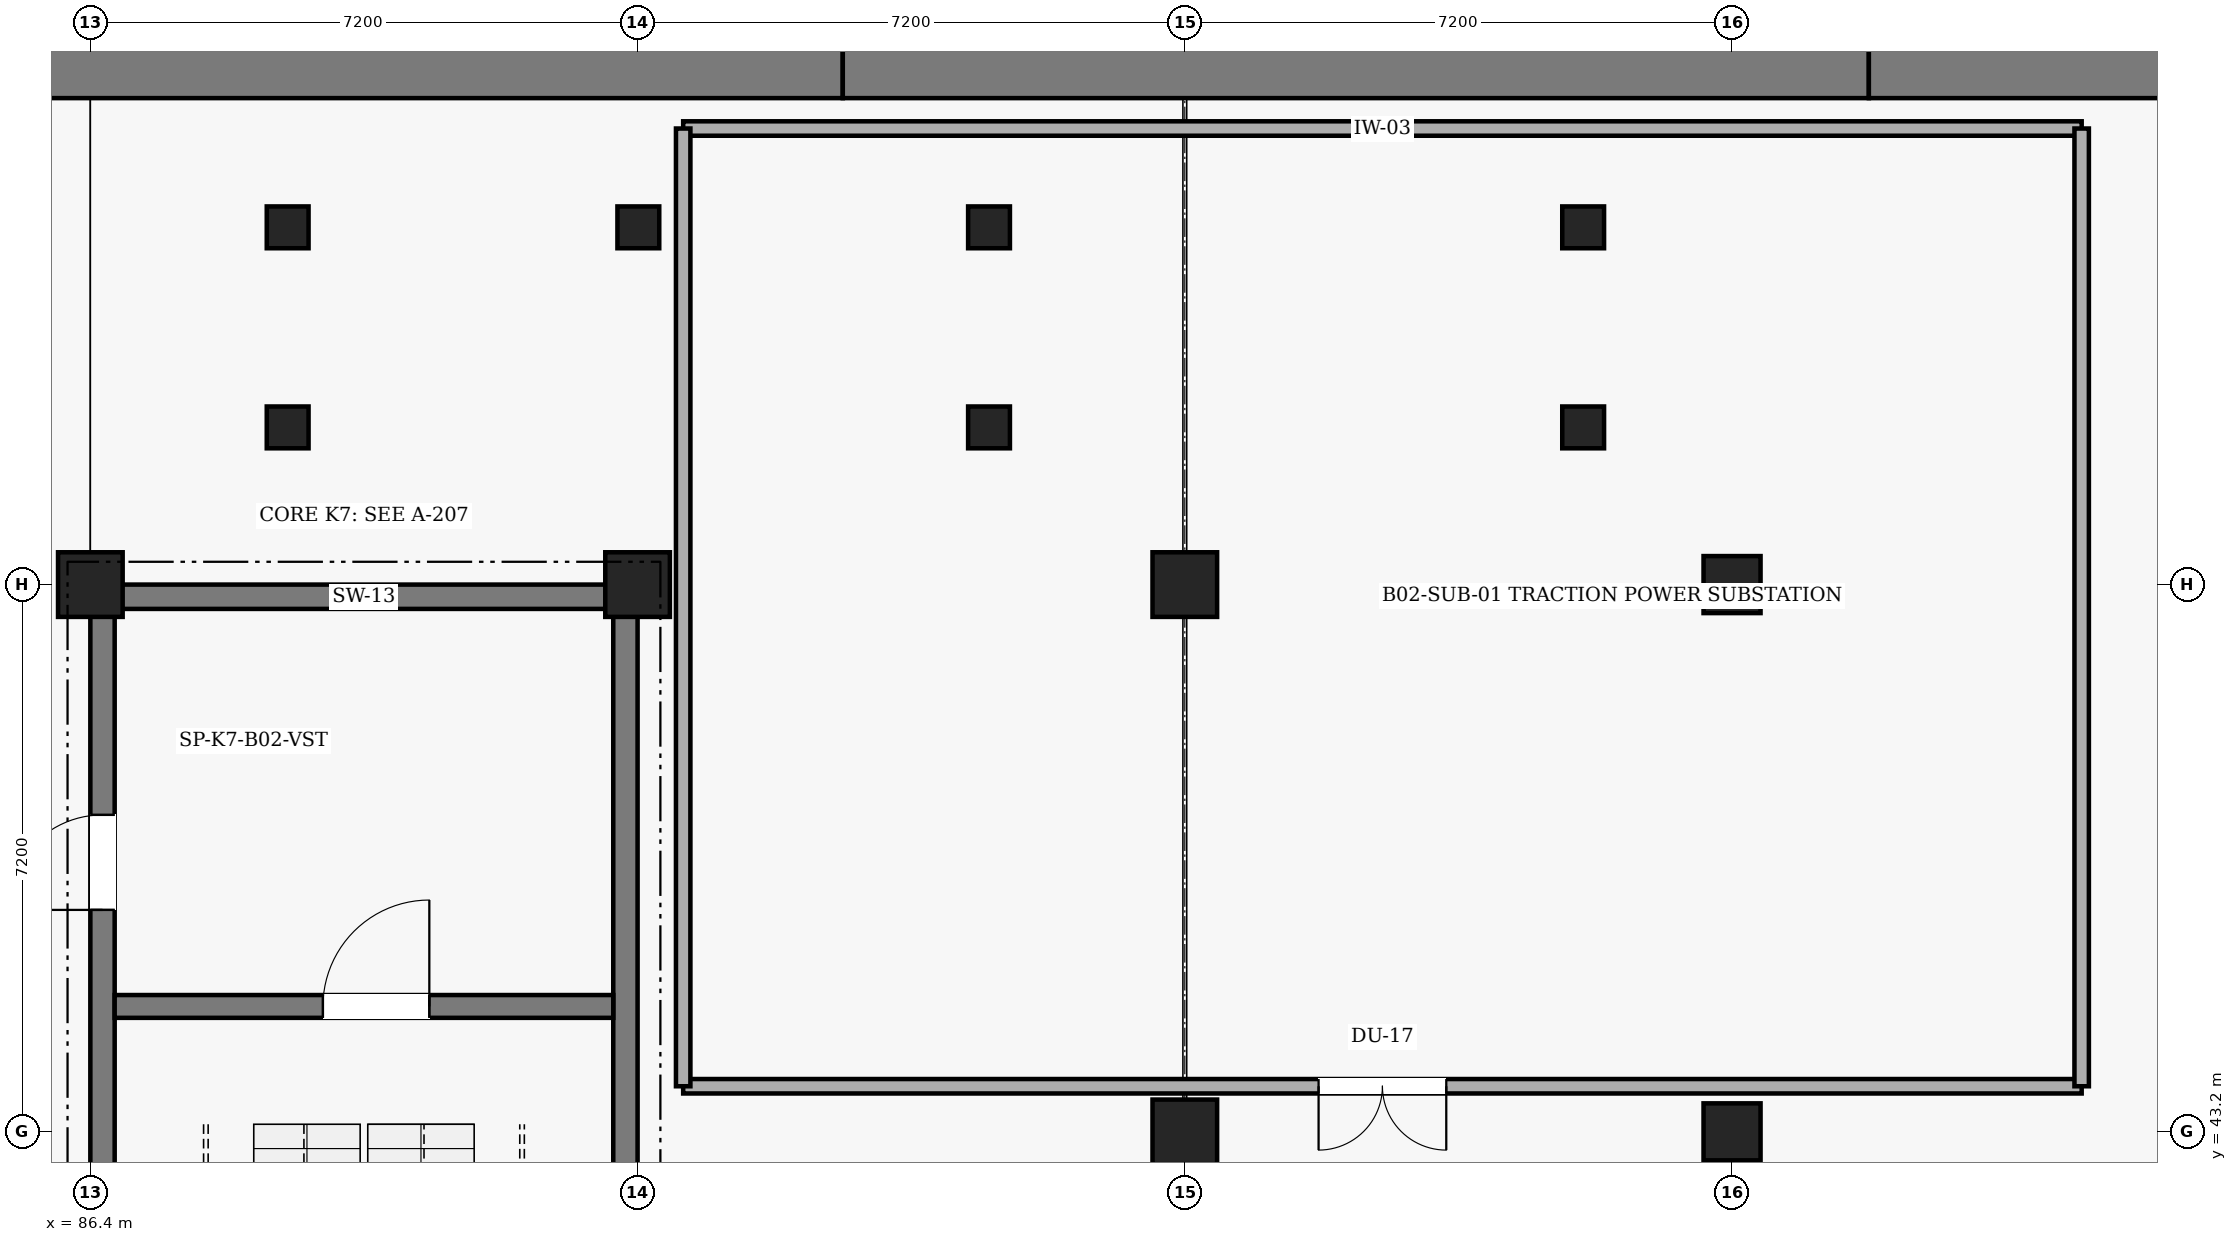
"""IFC4 building model, lengths in metres.
Left out: names, types, materials, properties, quantities, classifications, styles, units other than length and angle.
Written with IfcOpenShell. Run it as: python <this file> out.ifc"""

import sys

from ifc_helpers import new_model, si_unit, direction, frame, frame_2d, origin, origin_2d, place, context, subcontext, project, spatial, rectangle, extrude, element, fill, save


model = new_model("IFC4")
c1 = context("Model", 3, precision=1e-05, world=origin(), true_north=direction((0.0, 1.0)))
c2 = subcontext(c1, "Body", "Model", "MODEL_VIEW")
j1 = project(units=[si_unit("LENGTHUNIT", "METRE"), si_unit("PLANEANGLEUNIT", "RADIAN")], contexts=[c1])
p1 = place(None, origin())
s1 = spatial("IfcSite", under=j1, at=p1, CompositionType="ELEMENT")
p2 = place(p1, origin())
s2 = spatial("IfcBuilding", under=s1, at=p2, CompositionType="ELEMENT")
p3 = place(p2, frame((0.0, 0.0, -10.8)))
s3 = spatial("IfcBuildingStorey", under=s2, at=p3, CompositionType="ELEMENT", Elevation=-10.8)
for number, where, z_axis, x_axis in (
    (1, (82.8, 57.2, 0.0), (0.0, 0.0, 1.0), (1.0, 0.0, 0.0)),
    (2, (96.3, 57.2, 0.0), (0.0, 0.0, 1.0), (1.0, 0.0, 0.0)),
):
    element("IfcWall", number, at=place(p3, frame(where, z_axis=z_axis, x_axis=x_axis)), inside=s3, PredefinedType="USERDEFINED", context=c2, shape_type="SweptSolid", body=[
        extrude(rectangle(XDim=13.5, YDim=0.8, at=frame_2d((6.75, 0.0))), origin(), (0.0, 0.0, 1.0), 5.0),
    ])
p4 = place(p3, frame((109.8, 57.2, 0.0), z_axis=(0.0, 0.0, 1.0), x_axis=(1.0, 0.0, 0.0)))
e3 = element("IfcWall", 3, at=p4, inside=s3, PredefinedType="USERDEFINED", context=c2, shape_type="SweptSolid", body=[
    extrude(rectangle(XDim=5.35, YDim=0.8, at=frame_2d((2.675, 0.0))), origin(), (0.0, 0.0, 1.0), 5.0),
])
p5 = place(p3, frame((86.4, 50.24, 0.0), z_axis=(0.0, 0.0, 1.0), x_axis=(1.0, 0.0, 0.0)))
e4 = element("IfcWall", 4, at=p5, inside=s3, PredefinedType="SHEAR", context=c2, shape_type="SweptSolid", body=[
    extrude(rectangle(XDim=7.2, YDim=0.32, at=frame_2d((3.6, 0.0))), origin(), (0.0, 0.0, 1.0), 5.4),
])
p6 = place(p3, frame((93.44, 50.08, 0.0), z_axis=(0.0, 0.0, 1.0), x_axis=(0.0, -1.0, 0.0)))
e5 = element("IfcWall", 5, at=p6, inside=s3, PredefinedType="SHEAR", context=c2, shape_type="SweptSolid", body=[
    extrude(rectangle(XDim=13.76, YDim=0.32, at=frame_2d((6.88, 0.0))), origin(), (0.0, 0.0, 1.0), 5.4),
])
p7 = place(p3, frame((86.56, 36.32, 0.0), z_axis=(0.0, 0.0, 1.0), x_axis=(0.0, 1.0, 0.0)))
e6 = element("IfcWall", 6, at=p7, inside=s3, PredefinedType="SHEAR", context=c2, shape_type="SweptSolid", body=[
    extrude(rectangle(XDim=13.76, YDim=0.32, at=frame_2d((6.88, 0.0))), origin(), (0.0, 0.0, 1.0), 5.4),
])
p8 = place(p7, frame((9.8, 0.0, 0.0)))
e7 = element("IfcOpeningElement", 7, at=p8, cuts=e6, PredefinedType="OPENING", context=c2, shape_type="SweptSolid", body=[
    extrude(rectangle(XDim=1.25, YDim=2.2, at=frame_2d((0.625, 1.1))), frame((0.0, 0.17, 0.0), z_axis=(0.0, -1.0, 0.0), x_axis=(1.0, 0.0, 0.0)), (0.0, 0.0, 1.0), 0.34),
])
p9 = place(p3, frame((86.72, 44.85, 0.0), z_axis=(0.0, 0.0, 1.0), x_axis=(1.0, 0.0, 0.0)))
e8 = element("IfcWall", 8, at=p9, inside=s3, PredefinedType="SHEAR", context=c2, shape_type="SweptSolid", body=[
    extrude(rectangle(XDim=6.56, YDim=0.3, at=frame_2d((3.28, 0.0))), origin(), (0.0, 0.0, 1.0), 5.4),
])
p10 = place(p9, frame((2.74, 0.0, 0.0)))
e9 = element("IfcOpeningElement", 9, at=p10, cuts=e8, PredefinedType="OPENING", context=c2, shape_type="SweptSolid", body=[
    extrude(rectangle(XDim=1.4, YDim=2.2, at=frame_2d((0.7, 1.1))), frame((0.0, 0.16, 0.0), z_axis=(0.0, -1.0, 0.0), x_axis=(1.0, 0.0, 0.0)), (0.0, 0.0, 1.0), 0.32),
])
for number, where, z_axis, x_axis in (
    (10, (86.4, 50.4, 0.0), (0.0, 0.0, 1.0), (1.0, 0.0, 0.0)),
    (11, (93.6, 50.4, 0.0), (0.0, 0.0, 1.0), (1.0, 0.0, 0.0)),
    (12, (100.8, 43.2, 0.0), (0.0, 0.0, 1.0), (1.0, 0.0, 0.0)),
    (13, (100.8, 50.4, 0.0), (0.0, 0.0, 1.0), (1.0, 0.0, 0.0)),
):
    element("IfcColumn", number, at=place(p3, frame(where, z_axis=z_axis, x_axis=x_axis)), inside=s3, PredefinedType="COLUMN", context=c2, shape_type="SweptSolid", body=[
        extrude(rectangle(XDim=0.85, YDim=0.85, at=origin_2d()), origin(), (0.0, 0.0, 1.0), 5.0),
    ])
for number, where, z_axis, x_axis in (
    (14, (108.0, 43.2, 0.0), (0.0, 0.0, 1.0), (1.0, 0.0, 0.0)),
    (15, (108.0, 50.4, 0.0), (0.0, 0.0, 1.0), (1.0, 0.0, 0.0)),
):
    element("IfcColumn", number, at=place(p3, frame(where, z_axis=z_axis, x_axis=x_axis)), inside=s3, PredefinedType="COLUMN", context=c2, shape_type="SweptSolid", body=[
        extrude(rectangle(XDim=0.75, YDim=0.75, at=origin_2d()), origin(), (0.0, 0.0, 1.0), 5.0),
    ])
for number, where, z_axis, x_axis in (
    (16, (106.041, 52.468, 0.0), (0.0, 0.0, 1.0), (1.0, 0.0, 0.0)),
    (17, (106.041, 55.1, 0.0), (0.0, 0.0, 1.0), (1.0, 0.0, 0.0)),
    (18, (88.996, 52.468, 0.0), (0.0, 0.0, 1.0), (1.0, 0.0, 0.0)),
    (19, (88.996, 55.1, 0.0), (0.0, 0.0, 1.0), (1.0, 0.0, 0.0)),
    (20, (93.61, 55.1, 0.0), (0.0, 0.0, 1.0), (1.0, 0.0, 0.0)),
    (21, (98.224, 52.468, 0.0), (0.0, 0.0, 1.0), (1.0, 0.0, 0.0)),
    (22, (98.224, 55.1, 0.0), (0.0, 0.0, 1.0), (1.0, 0.0, 0.0)),
):
    element("IfcColumn", number, at=place(p3, frame(where, z_axis=z_axis, x_axis=x_axis)), inside=s3, PredefinedType="COLUMN", context=c2, shape_type="SweptSolid", body=[
        extrude(rectangle(XDim=0.55, YDim=0.55, at=origin_2d()), origin(), (0.0, 0.0, 1.0), 5.0),
    ])
p11 = place(p3, frame((94.2, 56.4, 0.0), z_axis=(0.0, 0.0, 1.0), x_axis=(1.0, 0.0, 0.0)))
e23 = element("IfcWall", 23, at=p11, inside=s3, PredefinedType="PARTITIONING", context=c2, shape_type="SweptSolid", body=[
    extrude(rectangle(XDim=18.4, YDim=0.19, at=frame_2d((9.2, 0.0))), origin(), (0.0, 0.0, 1.0), 4.2),
])
p12 = place(p3, frame((112.6, 43.8, 0.0), z_axis=(0.0, 0.0, 1.0), x_axis=(-1.0, 0.0, 0.0)))
e24 = element("IfcWall", 24, at=p12, inside=s3, PredefinedType="PARTITIONING", context=c2, shape_type="SweptSolid", body=[
    extrude(rectangle(XDim=18.4, YDim=0.19, at=frame_2d((9.2, 0.0))), origin(), (0.0, 0.0, 1.0), 4.2),
])
p13 = place(p12, frame((8.36, 0.0, 0.0)))
e25 = element("IfcOpeningElement", 25, at=p13, cuts=e24, PredefinedType="OPENING", context=c2, shape_type="SweptSolid", body=[
    extrude(rectangle(XDim=1.68, YDim=2.28, at=frame_2d((0.84, 1.14))), frame((0.0, 0.105, 0.0), z_axis=(0.0, -1.0, 0.0), x_axis=(1.0, 0.0, 0.0)), (0.0, 0.0, 1.0), 0.21),
])
for number, where, z_axis, x_axis in (
    (26, (112.6, 56.4, 0.0), (0.0, 0.0, 1.0), (0.0, -1.0, 0.0)),
    (27, (94.2, 43.8, 0.0), (0.0, 0.0, 1.0), (0.0, 1.0, 0.0)),
):
    element("IfcWall", number, at=place(p3, frame(where, z_axis=z_axis, x_axis=x_axis)), inside=s3, PredefinedType="PARTITIONING", context=c2, shape_type="SweptSolid", body=[
        extrude(rectangle(XDim=12.6, YDim=0.19, at=frame_2d((6.3, 0.0))), origin(), (0.0, 0.0, 1.0), 4.1),
    ])
p14 = place(p10, origin())
e28 = element("IfcDoor", 28, at=p14, inside=s3, OperationType="SINGLE_SWING_RIGHT", PredefinedType="DOOR", context=c2, shape_type="SweptSolid", body=[
    extrude(rectangle(XDim=1.4, YDim=2.2, at=frame_2d((0.7, 1.1))), frame((0.0, 0.025, 0.0), z_axis=(0.0, -1.0, 0.0), x_axis=(1.0, 0.0, 0.0)), (0.0, 0.0, 1.0), 0.05),
])
fill(e9, e28)
p15 = place(p8, origin())
e29 = element("IfcDoor", 29, at=p15, inside=s3, OperationType="SINGLE_SWING_LEFT", PredefinedType="DOOR", context=c2, shape_type="SweptSolid", body=[
    extrude(rectangle(XDim=1.25, YDim=2.2, at=frame_2d((0.625, 1.1))), frame((0.0, 0.025, 0.0), z_axis=(0.0, -1.0, 0.0), x_axis=(1.0, 0.0, 0.0)), (0.0, 0.0, 1.0), 0.05),
])
fill(e7, e29)
p16 = place(p13, origin())
e30 = element("IfcDoor", 30, at=p16, inside=s3, OperationType="DOUBLE_DOOR_SINGLE_SWING", PredefinedType="DOOR", context=c2, shape_type="SweptSolid", body=[
    extrude(rectangle(XDim=1.68, YDim=2.28, at=frame_2d((0.84, 1.14))), frame((0.0, 0.025, 0.0), z_axis=(0.0, -1.0, 0.0), x_axis=(1.0, 0.0, 0.0)), (0.0, 0.0, 1.0), 0.05),
])
fill(e25, e30)
save(model, sys.argv[1])
